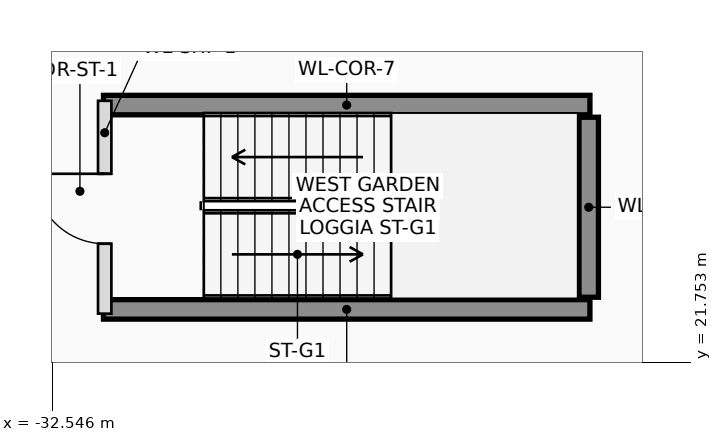
"""IFC4 building model, lengths in metres.
Left out: names, types, materials, properties, quantities, classifications, styles, units other than length and angle.
Written with IfcOpenShell. Run it as: python <this file> out.ifc"""

import sys

from ifc_helpers import new_model, si_unit, direction, frame, frame_2d, origin, place, context, subcontext, project, spatial, rectangle, extrude, element, fill, save


model = new_model("IFC4")
c1 = context("Model", 3, precision=1e-05, world=origin(), true_north=direction((0.0, 1.0)))
c2 = subcontext(c1, "Body", "Model", "MODEL_VIEW")
j1 = project(units=[si_unit("LENGTHUNIT", "METRE"), si_unit("PLANEANGLEUNIT", "RADIAN")], contexts=[c1])
p1 = place(None, origin())
s1 = spatial("IfcSite", under=j1, at=p1, CompositionType="ELEMENT")
p2 = place(p1, origin())
s2 = spatial("IfcBuilding", under=s1, at=p2, CompositionType="ELEMENT")
p3 = place(p2, frame((0.0, 0.0, 16.2)))
s3 = spatial("IfcBuildingStorey", under=s2, at=p3, CompositionType="ELEMENT", Elevation=16.2)
for number, where, z_axis, x_axis in (
    (1, (-31.7, 25.98, 0.0), (0.0, 0.0, 1.0), (1.0, 0.0, 0.0)),
    (2, (-31.7, 22.62, 0.0), (0.0, 0.0, 1.0), (1.0, 0.0, 0.0)),
):
    element("IfcWall", number, at=place(p3, frame(where, z_axis=z_axis, x_axis=x_axis)), inside=s3, PredefinedType="SHEAR", context=c2, shape_type="SweptSolid", body=[
        extrude(rectangle(XDim=8.0, YDim=0.32, at=frame_2d((4.0, 0.0))), origin(), (0.0, 0.0, 1.0), 3.9),
    ])
p4 = place(p3, frame((-23.72, 22.82, 0.0), z_axis=(0.0, 0.0, 1.0), x_axis=(0.0, 1.0, 0.0)))
e3 = element("IfcWall", 3, at=p4, inside=s3, PredefinedType="SHEAR", context=c2, shape_type="SweptSolid", body=[
    extrude(rectangle(XDim=2.96, YDim=0.32, at=frame_2d((1.48, 0.0))), origin(), (0.0, 0.0, 1.0), 3.9),
])
p5 = place(p3, frame((-31.68, 22.55, 0.0), z_axis=(0.0, 0.0, 1.0), x_axis=(0.0, 1.0, 0.0)))
e4 = element("IfcWall", 4, at=p5, inside=s3, PredefinedType="PLUMBINGWALL", context=c2, shape_type="SweptSolid", body=[
    extrude(rectangle(XDim=3.5, YDim=0.22, at=frame_2d((1.75, 0.0))), origin(), (0.0, 0.0, 1.0), 3.56),
])
p6 = place(p5, frame((1.15, 0.0, 0.0)))
e5 = element("IfcOpeningElement", 5, at=p6, cuts=e4, PredefinedType="OPENING", context=c2, shape_type="SweptSolid", body=[
    extrude(rectangle(XDim=1.15, YDim=2.15, at=frame_2d((0.575, 1.075))), frame((0.0, 0.12, 0.0), z_axis=(0.0, -1.0, 0.0), x_axis=(1.0, 0.0, 0.0)), (0.0, 0.0, 1.0), 0.24),
])
p7 = place(p6, origin())
e6 = element("IfcDoor", 6, at=p7, inside=s3, OperationType="SINGLE_SWING_RIGHT", PredefinedType="DOOR", context=c2, shape_type="SweptSolid", body=[
    extrude(rectangle(XDim=1.15, YDim=2.15, at=frame_2d((0.575, 1.075))), frame((0.0, 0.025, 0.0), z_axis=(0.0, -1.0, 0.0), x_axis=(1.0, 0.0, 0.0)), (0.0, 0.0, 1.0), 0.05),
])
fill(e5, e6)
save(model, sys.argv[1])
